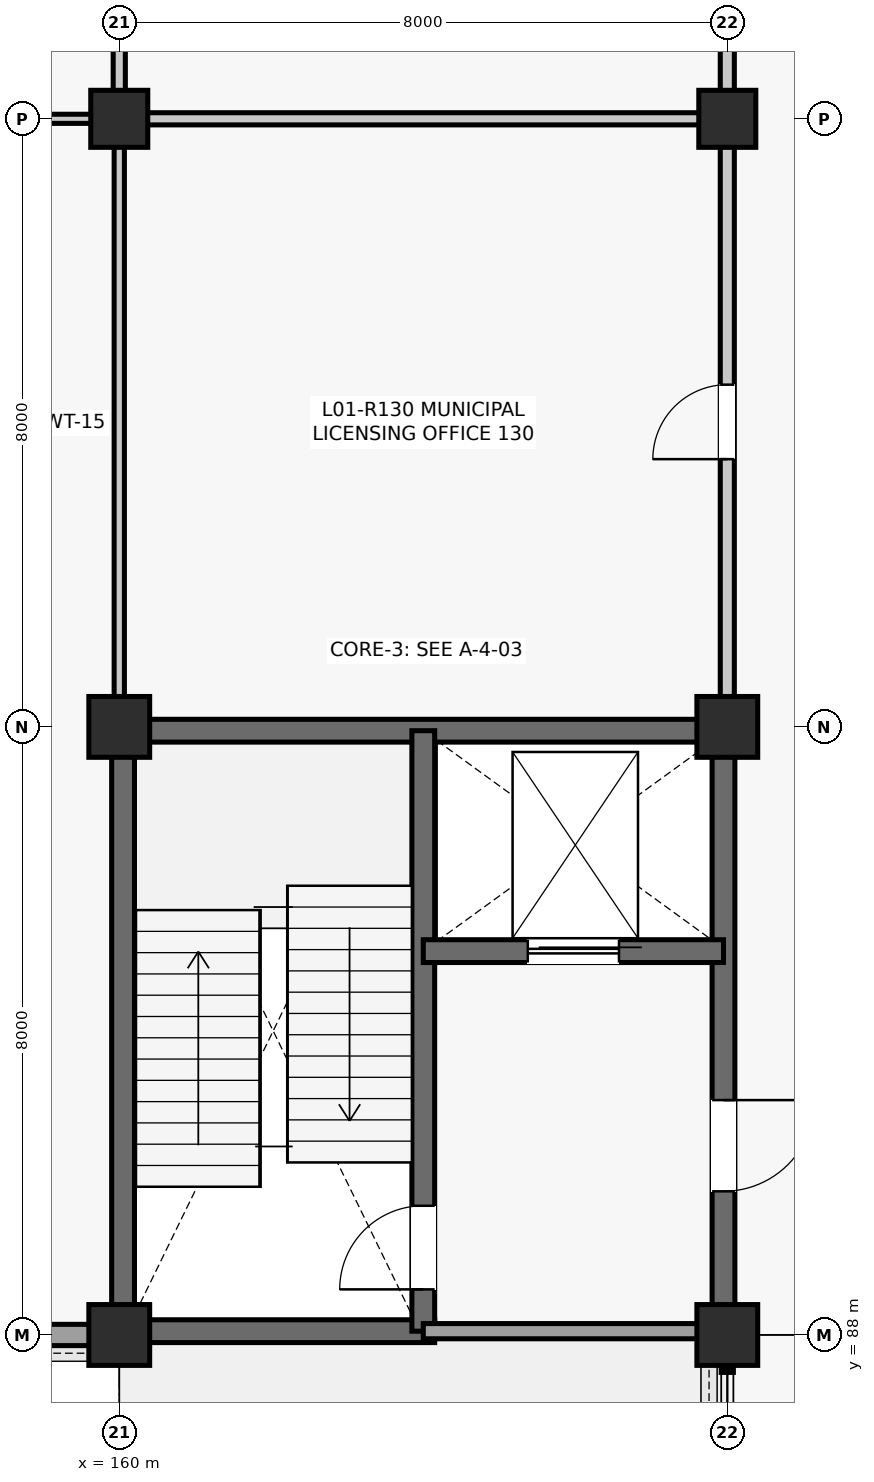
"""IFC4 building model, lengths in metres.
Left out: names, types, materials, properties, quantities, classifications, styles, units other than length and angle.
Written with IfcOpenShell. Run it as: python <this file> out.ifc"""

import sys

from ifc_helpers import new_model, si_unit, direction, frame, frame_2d, origin, origin_2d, place, context, subcontext, project, spatial, rectangle, extrude, element, fill, save


model = new_model("IFC4")
c1 = context("Model", 3, precision=1e-05, world=origin(), true_north=direction((0.0, 1.0)))
c2 = subcontext(c1, "Body", "Model", "MODEL_VIEW")
j1 = project(units=[si_unit("LENGTHUNIT", "METRE"), si_unit("PLANEANGLEUNIT", "RADIAN")], contexts=[c1])
p1 = place(None, origin())
s1 = spatial("IfcSite", under=j1, at=p1, CompositionType="ELEMENT")
p2 = place(p1, origin())
s2 = spatial("IfcBuilding", under=s1, at=p2, CompositionType="ELEMENT")
p3 = place(p2, frame((0.0, 0.0, 5.28)))
s3 = spatial("IfcBuildingStorey", under=s2, at=p3, CompositionType="ELEMENT", Elevation=5.28)
for number, where, z_axis, x_axis in (
    (1, (160.0, 88.0, 0.0), (0.0, 0.0, 1.0), (1.0, 0.0, 0.0)),
    (2, (160.0, 96.0, 0.0), (0.0, 0.0, 1.0), (1.0, 0.0, 0.0)),
):
    element("IfcColumn", number, at=place(p3, frame(where, z_axis=z_axis, x_axis=x_axis)), inside=s3, PredefinedType="COLUMN", context=c2, shape_type="SweptSolid", body=[
        extrude(rectangle(XDim=0.8, YDim=0.8, at=origin_2d()), origin(), (0.0, 0.0, 1.0), 4.62),
    ])
p4 = place(p3, frame((160.0, 104.0, 0.0), z_axis=(0.0, 0.0, 1.0), x_axis=(1.0, 0.0, 0.0)))
e3 = element("IfcColumn", 3, at=p4, inside=s3, PredefinedType="COLUMN", context=c2, shape_type="SweptSolid", body=[
    extrude(rectangle(XDim=0.75, YDim=0.75, at=origin_2d()), origin(), (0.0, 0.0, 1.0), 4.62),
])
for number, where, z_axis, x_axis in (
    (4, (168.0, 88.0, 0.0), (0.0, 0.0, 1.0), (1.0, 0.0, 0.0)),
    (5, (168.0, 96.0, 0.0), (0.0, 0.0, 1.0), (1.0, 0.0, 0.0)),
):
    element("IfcColumn", number, at=place(p3, frame(where, z_axis=z_axis, x_axis=x_axis)), inside=s3, PredefinedType="COLUMN", context=c2, shape_type="SweptSolid", body=[
        extrude(rectangle(XDim=0.8, YDim=0.8, at=origin_2d()), origin(), (0.0, 0.0, 1.0), 4.62),
    ])
p5 = place(p3, frame((168.0, 104.0, 0.0), z_axis=(0.0, 0.0, 1.0), x_axis=(1.0, 0.0, 0.0)))
e6 = element("IfcColumn", 6, at=p5, inside=s3, PredefinedType="COLUMN", context=c2, shape_type="SweptSolid", body=[
    extrude(rectangle(XDim=0.75, YDim=0.75, at=origin_2d()), origin(), (0.0, 0.0, 1.0), 4.62),
])
p6 = place(p3, frame((152.36, 88.0, 0.0), z_axis=(0.0, 0.0, 1.0), x_axis=(1.0, 0.0, 0.0)))
e7 = element("IfcWall", 7, at=p6, inside=s3, PredefinedType="SOLIDWALL", context=c2, shape_type="SweptSolid", body=[
    extrude(rectangle(XDim=7.255, YDim=0.28, at=frame_2d((3.627, 0.0))), origin(), (0.0, 0.0, 1.0), 3.977),
])
p7 = place(p6, frame((2.728, 0.0, 0.9)))
e8 = element("IfcOpeningElement", 8, at=p7, cuts=e7, PredefinedType="OPENING", context=c2, shape_type="SweptSolid", body=[
    extrude(rectangle(XDim=1.8, YDim=2.3, at=frame_2d((0.9, 1.15))), frame((0.0, 0.15, 0.0), z_axis=(0.0, -1.0, 0.0), x_axis=(1.0, 0.0, 0.0)), (0.0, 0.0, 1.0), 0.3),
])
for number, where, z_axis, x_axis in (
    (9, (160.05, 88.29, 0.0), (0.0, 0.0, 1.0), (0.0, 1.0, 0.0)),
    (10, (160.29, 95.95, 0.0), (0.0, 0.0, 1.0), (1.0, 0.0, 0.0)),
):
    element("IfcWall", number, at=place(p3, frame(where, z_axis=z_axis, x_axis=x_axis)), inside=s3, PredefinedType="SHEAR", context=c2, shape_type="SweptSolid", body=[
        extrude(rectangle(XDim=7.42, YDim=0.3, at=frame_2d((3.71, 0.0))), origin(), (0.0, 0.0, 1.0), 4.335),
    ])
p8 = place(p3, frame((167.95, 88.29, 0.0), z_axis=(0.0, 0.0, 1.0), x_axis=(0.0, 1.0, 0.0)))
e11 = element("IfcWall", 11, at=p8, inside=s3, PredefinedType="SHEAR", context=c2, shape_type="SweptSolid", body=[
    extrude(rectangle(XDim=7.42, YDim=0.3, at=frame_2d((3.71, 0.0))), origin(), (0.0, 0.0, 1.0), 4.335),
])
p9 = place(p8, frame((1.6, 0.0, 0.0)))
e12 = element("IfcOpeningElement", 12, at=p9, cuts=e11, PredefinedType="OPENING", context=c2, shape_type="SweptSolid", body=[
    extrude(rectangle(XDim=1.2, YDim=2.15, at=frame_2d((0.6, 1.075))), frame((0.0, 0.16, 0.0), z_axis=(0.0, -1.0, 0.0), x_axis=(1.0, 0.0, 0.0)), (0.0, 0.0, 1.0), 0.32),
])
p10 = place(p3, frame((160.29, 88.05, 0.0), z_axis=(0.0, 0.0, 1.0), x_axis=(1.0, 0.0, 0.0)))
e13 = element("IfcWall", 13, at=p10, inside=s3, PredefinedType="SHEAR", context=c2, shape_type="SweptSolid", body=[
    extrude(rectangle(XDim=3.86, YDim=0.3, at=frame_2d((1.93, 0.0))), origin(), (0.0, 0.0, 1.0), 4.335),
])
p11 = place(p3, frame((164.0, 88.05, 0.0), z_axis=(0.0, 0.0, 1.0), x_axis=(0.0, 1.0, 0.0)))
e14 = element("IfcWall", 14, at=p11, inside=s3, PredefinedType="SHEAR", context=c2, shape_type="SweptSolid", body=[
    extrude(rectangle(XDim=7.9, YDim=0.3, at=frame_2d((3.95, 0.0))), origin(), (0.0, 0.0, 1.0), 4.335),
])
p12 = place(p11, frame((0.55, 0.0, 0.0)))
e15 = element("IfcOpeningElement", 15, at=p12, cuts=e14, PredefinedType="OPENING", context=c2, shape_type="SweptSolid", body=[
    extrude(rectangle(XDim=1.1, YDim=2.15, at=frame_2d((0.55, 1.075))), frame((0.0, 0.16, 0.0), z_axis=(0.0, -1.0, 0.0), x_axis=(1.0, 0.0, 0.0)), (0.0, 0.0, 1.0), 0.32),
])
p13 = place(p3, frame((164.0, 93.05, 0.0), z_axis=(0.0, 0.0, 1.0), x_axis=(1.0, 0.0, 0.0)))
e16 = element("IfcWall", 16, at=p13, inside=s3, PredefinedType="SHEAR", context=c2, shape_type="SweptSolid", body=[
    extrude(rectangle(XDim=3.95, YDim=0.3, at=frame_2d((1.975, 0.0))), origin(), (0.0, 0.0, 1.0), 4.335),
])
p14 = place(p13, frame((1.375, 0.0, 0.0)))
e17 = element("IfcOpeningElement", 17, at=p14, cuts=e16, PredefinedType="OPENING", context=c2, shape_type="SweptSolid", body=[
    extrude(rectangle(XDim=1.2, YDim=2.2, at=frame_2d((0.6, 1.1))), frame((0.0, 0.16, 0.0), z_axis=(0.0, -1.0, 0.0), x_axis=(1.0, 0.0, 0.0)), (0.0, 0.0, 1.0), 0.32),
])
p15 = place(p3, frame((164.0, 88.05, 0.0), z_axis=(0.0, 0.0, 1.0), x_axis=(1.0, 0.0, 0.0)))
e18 = element("IfcWall", 18, at=p15, inside=s3, PredefinedType="PARTITIONING", context=c2, shape_type="SweptSolid", body=[
    extrude(rectangle(XDim=3.61, YDim=0.2, at=frame_2d((1.805, 0.0))), origin(), (0.0, 0.0, 1.0), 3.903),
])
p16 = place(p3, frame((160.0, 96.39, 0.0), z_axis=(0.0, 0.0, 1.0), x_axis=(0.0, 1.0, 0.0)))
e19 = element("IfcWall", 19, at=p16, inside=s3, PredefinedType="PARTITIONING", context=c2, shape_type="SweptSolid", body=[
    extrude(rectangle(XDim=7.245, YDim=0.135, at=frame_2d((3.623, 0.0))), origin(), (0.0, 0.0, 1.0), 3.787),
])
p17 = place(p3, frame((152.365, 104.0, 0.0), z_axis=(0.0, 0.0, 1.0), x_axis=(1.0, 0.0, 0.0)))
e20 = element("IfcWall", 20, at=p17, inside=s3, PredefinedType="PARTITIONING", context=c2, shape_type="SweptSolid", body=[
    extrude(rectangle(XDim=7.27, YDim=0.12, at=frame_2d((3.635, 0.0))), origin(), (0.0, 0.0, 1.0), 3.712),
])
p18 = place(p3, frame((160.0, 104.365, 0.0), z_axis=(0.0, 0.0, 1.0), x_axis=(0.0, 1.0, 0.0)))
e21 = element("IfcWall", 21, at=p18, inside=s3, PredefinedType="PARTITIONING", context=c2, shape_type="SweptSolid", body=[
    extrude(rectangle(XDim=7.27, YDim=0.16, at=frame_2d((3.635, 0.0))), origin(), (0.0, 0.0, 1.0), 3.857),
])
p19 = place(p3, frame((168.0, 96.39, 0.0), z_axis=(0.0, 0.0, 1.0), x_axis=(0.0, 1.0, 0.0)))
e22 = element("IfcWall", 22, at=p19, inside=s3, PredefinedType="PARTITIONING", context=c2, shape_type="SweptSolid", body=[
    extrude(rectangle(XDim=7.245, YDim=0.185, at=frame_2d((3.623, 0.0))), origin(), (0.0, 0.0, 1.0), 3.857),
])
p20 = place(p19, frame((3.133, 0.0, 0.0)))
e23 = element("IfcOpeningElement", 23, at=p20, cuts=e22, PredefinedType="OPENING", context=c2, shape_type="SweptSolid", body=[
    extrude(rectangle(XDim=0.98, YDim=2.15, at=frame_2d((0.49, 1.075))), frame((0.0, 0.103, 0.0), z_axis=(0.0, -1.0, 0.0), x_axis=(1.0, 0.0, 0.0)), (0.0, 0.0, 1.0), 0.205),
])
p21 = place(p3, frame((160.365, 104.0, 0.0), z_axis=(0.0, 0.0, 1.0), x_axis=(1.0, 0.0, 0.0)))
e24 = element("IfcWall", 24, at=p21, inside=s3, PredefinedType="PARTITIONING", context=c2, shape_type="SweptSolid", body=[
    extrude(rectangle(XDim=7.27, YDim=0.16, at=frame_2d((3.635, 0.0))), origin(), (0.0, 0.0, 1.0), 3.787),
])
p22 = place(p3, frame((168.0, 104.365, 0.0), z_axis=(0.0, 0.0, 1.0), x_axis=(0.0, 1.0, 0.0)))
e25 = element("IfcWall", 25, at=p22, inside=s3, PredefinedType="PARTITIONING", context=c2, shape_type="SweptSolid", body=[
    extrude(rectangle(XDim=7.27, YDim=0.185, at=frame_2d((3.635, 0.0))), origin(), (0.0, 0.0, 1.0), 3.781),
])
p23 = place(p22, frame((1.343, 0.0, 0.0)))
e26 = element("IfcOpeningElement", 26, at=p23, cuts=e25, PredefinedType="OPENING", context=c2, shape_type="SweptSolid", body=[
    extrude(rectangle(XDim=0.95, YDim=2.1, at=frame_2d((0.475, 1.05))), frame((0.0, 0.103, 0.0), z_axis=(0.0, -1.0, 0.0), x_axis=(1.0, 0.0, 0.0)), (0.0, 0.0, 1.0), 0.205),
])
p24 = place(p22, frame((5.341, 0.0, 0.0)))
e27 = element("IfcOpeningElement", 27, at=p24, cuts=e25, PredefinedType="OPENING", context=c2, shape_type="SweptSolid", body=[
    extrude(rectangle(XDim=0.95, YDim=2.1, at=frame_2d((0.475, 1.05))), frame((0.0, 0.103, 0.0), z_axis=(0.0, -1.0, 0.0), x_axis=(1.0, 0.0, 0.0)), (0.0, 0.0, 1.0), 0.205),
])
p25 = place(p12, origin())
e28 = element("IfcDoor", 28, at=p25, inside=s3, OperationType="SINGLE_SWING_LEFT", PredefinedType="DOOR", context=c2, shape_type="SweptSolid", body=[
    extrude(rectangle(XDim=1.1, YDim=2.15, at=frame_2d((0.55, 1.075))), frame((0.0, 0.025, 0.0), z_axis=(0.0, -1.0, 0.0), x_axis=(1.0, 0.0, 0.0)), (0.0, 0.0, 1.0), 0.05),
])
fill(e15, e28)
p26 = place(p14, origin())
e29 = element("IfcDoor", 29, at=p26, inside=s3, OperationType="SLIDING_TO_LEFT", PredefinedType="DOOR", context=c2, shape_type="SweptSolid", body=[
    extrude(rectangle(XDim=1.2, YDim=2.2, at=frame_2d((0.6, 1.1))), frame((0.0, 0.025, 0.0), z_axis=(0.0, -1.0, 0.0), x_axis=(1.0, 0.0, 0.0)), (0.0, 0.0, 1.0), 0.05),
])
fill(e17, e29)
p27 = place(p9, frame((1.2, 0.0, 0.0), z_axis=(0.0, 0.0, 1.0), x_axis=(-1.0, 0.0, 0.0)))
e30 = element("IfcDoor", 30, at=p27, inside=s3, OperationType="SINGLE_SWING_RIGHT", PredefinedType="DOOR", context=c2, shape_type="SweptSolid", body=[
    extrude(rectangle(XDim=1.2, YDim=2.15, at=frame_2d((0.6, 1.075))), frame((0.0, 0.025, 0.0), z_axis=(0.0, -1.0, 0.0), x_axis=(1.0, 0.0, 0.0)), (0.0, 0.0, 1.0), 0.05),
])
fill(e12, e30)
p28 = place(p20, origin())
e31 = element("IfcDoor", 31, at=p28, inside=s3, OperationType="SINGLE_SWING_LEFT", PredefinedType="DOOR", context=c2, shape_type="SweptSolid", body=[
    extrude(rectangle(XDim=0.98, YDim=2.15, at=frame_2d((0.49, 1.075))), frame((0.0, 0.025, 0.0), z_axis=(0.0, -1.0, 0.0), x_axis=(1.0, 0.0, 0.0)), (0.0, 0.0, 1.0), 0.05),
])
fill(e23, e31)
save(model, sys.argv[1])
